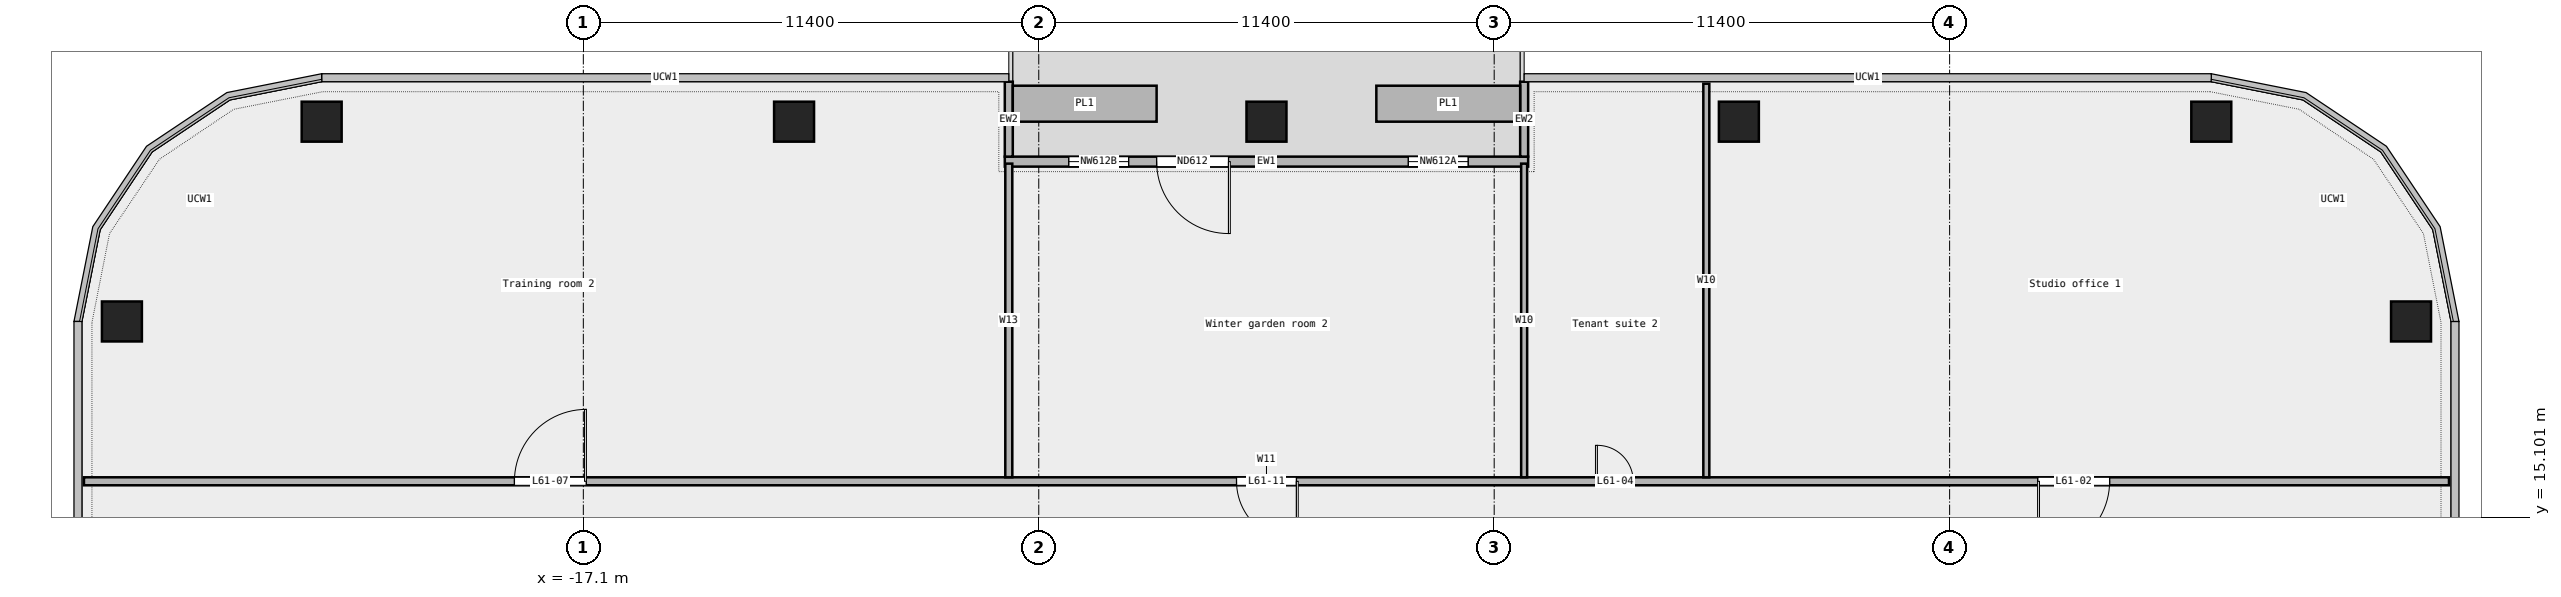
"""IFC4 building model, lengths in metres.
Left out: names, types, materials, properties, quantities, classifications, styles, units other than length and angle.
Written with IfcOpenShell. Run it as: python <this file> out.ifc"""

import sys

from ifc_helpers import new_model, si_unit, direction, frame, frame_2d, origin, origin_2d, place, context, subcontext, project, spatial, rectangle, extrude, element, fill, save


model = new_model("IFC4")
c1 = context("Model", 3, precision=1e-05, world=origin(), true_north=direction((0.0, 1.0)))
c2 = subcontext(c1, "Body", "Model", "MODEL_VIEW")
j1 = project(units=[si_unit("LENGTHUNIT", "METRE"), si_unit("PLANEANGLEUNIT", "RADIAN")], contexts=[c1])
p1 = place(None, origin())
s1 = spatial("IfcSite", under=j1, at=p1, CompositionType="ELEMENT")
p2 = place(p1, origin())
s2 = spatial("IfcBuilding", under=s1, at=p2, CompositionType="ELEMENT")
p3 = place(p2, frame((0.0, 0.0, 283.4)))
s3 = spatial("IfcBuildingStorey", under=s2, at=p3, CompositionType="ELEMENT", Elevation=283.4)
for number, where, z_axis, x_axis in (
    (1, (28.65, 20.0, 0.0), (0.0, 0.0, 1.0), (1.0, 0.0, 0.0)),
    (2, (23.65, 25.0, 0.0), (0.0, 0.0, 1.0), (1.0, 0.0, 0.0)),
    (3, (11.825, 25.0, 0.0), (0.0, 0.0, 1.0), (1.0, 0.0, 0.0)),
    (4, (0.0, 25.0, 0.0), (0.0, 0.0, 1.0), (1.0, 0.0, 0.0)),
    (5, (-11.825, 25.0, 0.0), (0.0, 0.0, 1.0), (1.0, 0.0, 0.0)),
    (6, (-23.65, 25.0, 0.0), (0.0, 0.0, 1.0), (1.0, 0.0, 0.0)),
    (7, (-28.65, 20.0, 0.0), (0.0, 0.0, 1.0), (1.0, 0.0, 0.0)),
):
    element("IfcColumn", number, at=place(p3, frame(where, z_axis=z_axis, x_axis=x_axis)), inside=s3, PredefinedType="COLUMN", context=c2, shape_type="SweptSolid", body=[
        extrude(rectangle(XDim=1.0, YDim=1.0, at=origin_2d()), origin(), (0.0, 0.0, 1.0), 3.6),
    ])
p4 = place(p3, frame((6.55, 24.0, 0.0), z_axis=(0.0, 0.0, 1.0), x_axis=(-1.0, 0.0, 0.0)))
e8 = element("IfcWall", 8, at=p4, inside=s3, PredefinedType="STANDARD", context=c2, shape_type="SweptSolid", body=[
    extrude(rectangle(XDim=13.1, YDim=0.25, at=frame_2d((6.55, 0.0))), origin(), (0.0, 0.0, 1.0), 3.6),
])
p5 = place(p4, frame((1.5, 0.0, 0.45)))
e9 = element("IfcOpeningElement", 9, at=p5, cuts=e8, PredefinedType="OPENING", context=c2, shape_type="SweptSolid", body=[
    extrude(rectangle(XDim=1.5, YDim=2.4, at=frame_2d((0.75, 1.2))), frame((0.0, 0.137, 0.0), z_axis=(0.0, -1.0, 0.0), x_axis=(1.0, 0.0, 0.0)), (0.0, 0.0, 1.0), 0.274),
])
p6 = place(p4, frame((7.5, 0.0, 0.0)))
e10 = element("IfcOpeningElement", 10, at=p6, cuts=e8, PredefinedType="OPENING", context=c2, shape_type="SweptSolid", body=[
    extrude(rectangle(XDim=1.8, YDim=2.4, at=frame_2d((0.9, 1.2))), frame((0.0, 0.137, 0.0), z_axis=(0.0, -1.0, 0.0), x_axis=(1.0, 0.0, 0.0)), (0.0, 0.0, 1.0), 0.274),
])
p7 = place(p4, frame((10.0, 0.0, 0.45)))
e11 = element("IfcOpeningElement", 11, at=p7, cuts=e8, PredefinedType="OPENING", context=c2, shape_type="SweptSolid", body=[
    extrude(rectangle(XDim=1.5, YDim=2.4, at=frame_2d((0.75, 1.2))), frame((0.0, 0.137, 0.0), z_axis=(0.0, -1.0, 0.0), x_axis=(1.0, 0.0, 0.0)), (0.0, 0.0, 1.0), 0.274),
])
for number, where, z_axis, x_axis in (
    (12, (6.45, 26.0, 0.0), (0.0, 0.0, 1.0), (0.0, -1.0, 0.0)),
    (13, (-6.45, 26.0, 0.0), (0.0, 0.0, 1.0), (0.0, -1.0, 0.0)),
):
    element("IfcWall", number, at=place(p3, frame(where, z_axis=z_axis, x_axis=x_axis)), inside=s3, PredefinedType="STANDARD", context=c2, shape_type="SweptSolid", body=[
        extrude(rectangle(XDim=1.875, YDim=0.2, at=frame_2d((0.938, 0.0))), origin(), (0.0, 0.0, 1.0), 3.6),
    ])
for number, where, z_axis, x_axis in (
    (14, (6.35, 25.45, 0.0), (0.0, 0.0, 1.0), (-1.0, 0.0, 0.0)),
    (15, (-2.75, 25.45, 0.0), (0.0, 0.0, 1.0), (-1.0, 0.0, 0.0)),
):
    element("IfcWall", number, at=place(p3, frame(where, z_axis=z_axis, x_axis=x_axis)), inside=s3, PredefinedType="STANDARD", context=c2, shape_type="SweptSolid", body=[
        extrude(rectangle(XDim=3.6, YDim=0.9, at=frame_2d((1.8, 0.0))), origin(), (0.0, 0.0, 1.0), 0.7),
    ])
p8 = place(p3, frame((-29.6, 16.0, 0.0), z_axis=(0.0, 0.0, 1.0), x_axis=(1.0, 0.0, 0.0)))
e16 = element("IfcWall", 16, at=p8, inside=s3, PredefinedType="PARTITIONING", context=c2, shape_type="SweptSolid", body=[
    extrude(rectangle(XDim=59.2, YDim=0.2, at=frame_2d((29.6, 0.0))), origin(), (0.0, 0.0, 1.0), 3.6),
])
p9 = place(p8, frame((48.905, 0.0, 0.0)))
e17 = element("IfcOpeningElement", 17, at=p9, cuts=e16, PredefinedType="OPENING", context=c2, shape_type="SweptSolid", body=[
    extrude(rectangle(XDim=1.8, YDim=2.1, at=frame_2d((0.9, 1.05))), frame((0.0, 0.112, 0.0), z_axis=(0.0, -1.0, 0.0), x_axis=(1.0, 0.0, 0.0)), (0.0, 0.0, 1.0), 0.224),
])
p10 = place(p8, frame((37.88, 0.0, 0.0)))
e18 = element("IfcOpeningElement", 18, at=p10, cuts=e16, PredefinedType="OPENING", context=c2, shape_type="SweptSolid", body=[
    extrude(rectangle(XDim=0.9, YDim=2.1, at=frame_2d((0.45, 1.05))), frame((0.0, 0.112, 0.0), z_axis=(0.0, -1.0, 0.0), x_axis=(1.0, 0.0, 0.0)), (0.0, 0.0, 1.0), 0.224),
])
p11 = place(p8, frame((10.775, 0.0, 0.0)))
e19 = element("IfcOpeningElement", 19, at=p11, cuts=e16, PredefinedType="OPENING", context=c2, shape_type="SweptSolid", body=[
    extrude(rectangle(XDim=1.8, YDim=2.1, at=frame_2d((0.9, 1.05))), frame((0.0, 0.112, 0.0), z_axis=(0.0, -1.0, 0.0), x_axis=(1.0, 0.0, 0.0)), (0.0, 0.0, 1.0), 0.224),
])
p12 = place(p8, frame((28.85, 0.0, 0.0)))
e20 = element("IfcOpeningElement", 20, at=p12, cuts=e16, PredefinedType="OPENING", context=c2, shape_type="SweptSolid", body=[
    extrude(rectangle(XDim=1.5, YDim=2.1, at=frame_2d((0.75, 1.05))), frame((0.0, 0.112, 0.0), z_axis=(0.0, -1.0, 0.0), x_axis=(1.0, 0.0, 0.0)), (0.0, 0.0, 1.0), 0.224),
])
p13 = place(p3, frame((-6.45, 16.1, 0.0), z_axis=(0.0, 0.0, 1.0), x_axis=(0.0, 1.0, 0.0)))
e21 = element("IfcWall", 21, at=p13, inside=s3, PredefinedType="PARTITIONING", context=c2, shape_type="SweptSolid", body=[
    extrude(rectangle(XDim=7.85, YDim=0.175, at=frame_2d((3.925, 0.0))), origin(), (0.0, 0.0, 1.0), 3.6),
])
p14 = place(p3, frame((6.45, 16.1, 0.0), z_axis=(0.0, 0.0, 1.0), x_axis=(0.0, 1.0, 0.0)))
e22 = element("IfcWall", 22, at=p14, inside=s3, PredefinedType="PARTITIONING", context=c2, shape_type="SweptSolid", body=[
    extrude(rectangle(XDim=7.85, YDim=0.15, at=frame_2d((3.925, 0.0))), origin(), (0.0, 0.0, 1.0), 3.6),
])
p15 = place(p3, frame((11.01, 16.1, 0.0), z_axis=(0.0, 0.0, 1.0), x_axis=(0.0, 1.0, 0.0)))
e23 = element("IfcWall", 23, at=p15, inside=s3, PredefinedType="PARTITIONING", context=c2, shape_type="SweptSolid", body=[
    extrude(rectangle(XDim=9.85, YDim=0.15, at=frame_2d((4.925, 0.0))), origin(), (0.0, 0.0, 1.0), 3.6),
])
p16 = place(p5, origin())
e24 = element("IfcWindow", 24, at=p16, inside=s3, PartitioningType="SINGLE_PANEL", PredefinedType="WINDOW", context=c2, shape_type="SweptSolid", body=[
    extrude(rectangle(XDim=1.5, YDim=2.4, at=frame_2d((0.75, 1.2))), frame((0.0, 0.03, 0.0), z_axis=(0.0, -1.0, 0.0), x_axis=(1.0, 0.0, 0.0)), (0.0, 0.0, 1.0), 0.06),
])
fill(e9, e24)
p17 = place(p6, origin())
e25 = element("IfcDoor", 25, at=p17, inside=s3, OperationType="DOUBLE_DOOR_SINGLE_SWING", PredefinedType="DOOR", context=c2, shape_type="SweptSolid", body=[
    extrude(rectangle(XDim=1.8, YDim=2.4, at=frame_2d((0.9, 1.2))), frame((0.0, 0.025, 0.0), z_axis=(0.0, -1.0, 0.0), x_axis=(1.0, 0.0, 0.0)), (0.0, 0.0, 1.0), 0.05),
])
fill(e10, e25)
p18 = place(p7, origin())
e26 = element("IfcWindow", 26, at=p18, inside=s3, PartitioningType="SINGLE_PANEL", PredefinedType="WINDOW", context=c2, shape_type="SweptSolid", body=[
    extrude(rectangle(XDim=1.5, YDim=2.4, at=frame_2d((0.75, 1.2))), frame((0.0, 0.03, 0.0), z_axis=(0.0, -1.0, 0.0), x_axis=(1.0, 0.0, 0.0)), (0.0, 0.0, 1.0), 0.06),
])
fill(e11, e26)
p19 = place(p9, origin())
e27 = element("IfcDoor", 27, at=p19, inside=s3, OperationType="DOUBLE_DOOR_SINGLE_SWING", PredefinedType="DOOR", context=c2, shape_type="SweptSolid", body=[
    extrude(rectangle(XDim=1.8, YDim=2.1, at=frame_2d((0.9, 1.05))), frame((0.0, 0.025, 0.0), z_axis=(0.0, -1.0, 0.0), x_axis=(1.0, 0.0, 0.0)), (0.0, 0.0, 1.0), 0.05),
])
fill(e17, e27)
p20 = place(p10, origin())
e28 = element("IfcDoor", 28, at=p20, inside=s3, OperationType="SINGLE_SWING_LEFT", PredefinedType="DOOR", context=c2, shape_type="SweptSolid", body=[
    extrude(rectangle(XDim=0.9, YDim=2.1, at=frame_2d((0.45, 1.05))), frame((0.0, 0.025, 0.0), z_axis=(0.0, -1.0, 0.0), x_axis=(1.0, 0.0, 0.0)), (0.0, 0.0, 1.0), 0.05),
])
fill(e18, e28)
p21 = place(p11, origin())
e29 = element("IfcDoor", 29, at=p21, inside=s3, OperationType="DOUBLE_DOOR_SINGLE_SWING", PredefinedType="DOOR", context=c2, shape_type="SweptSolid", body=[
    extrude(rectangle(XDim=1.8, YDim=2.1, at=frame_2d((0.9, 1.05))), frame((0.0, 0.025, 0.0), z_axis=(0.0, -1.0, 0.0), x_axis=(1.0, 0.0, 0.0)), (0.0, 0.0, 1.0), 0.05),
])
fill(e19, e29)
p22 = place(p12, origin())
e30 = element("IfcDoor", 30, at=p22, inside=s3, OperationType="DOUBLE_DOOR_SINGLE_SWING", PredefinedType="DOOR", context=c2, shape_type="SweptSolid", body=[
    extrude(rectangle(XDim=1.5, YDim=2.1, at=frame_2d((0.75, 1.05))), frame((0.0, 0.025, 0.0), z_axis=(0.0, -1.0, 0.0), x_axis=(1.0, 0.0, 0.0)), (0.0, 0.0, 1.0), 0.05),
])
fill(e20, e30)
save(model, sys.argv[1])
